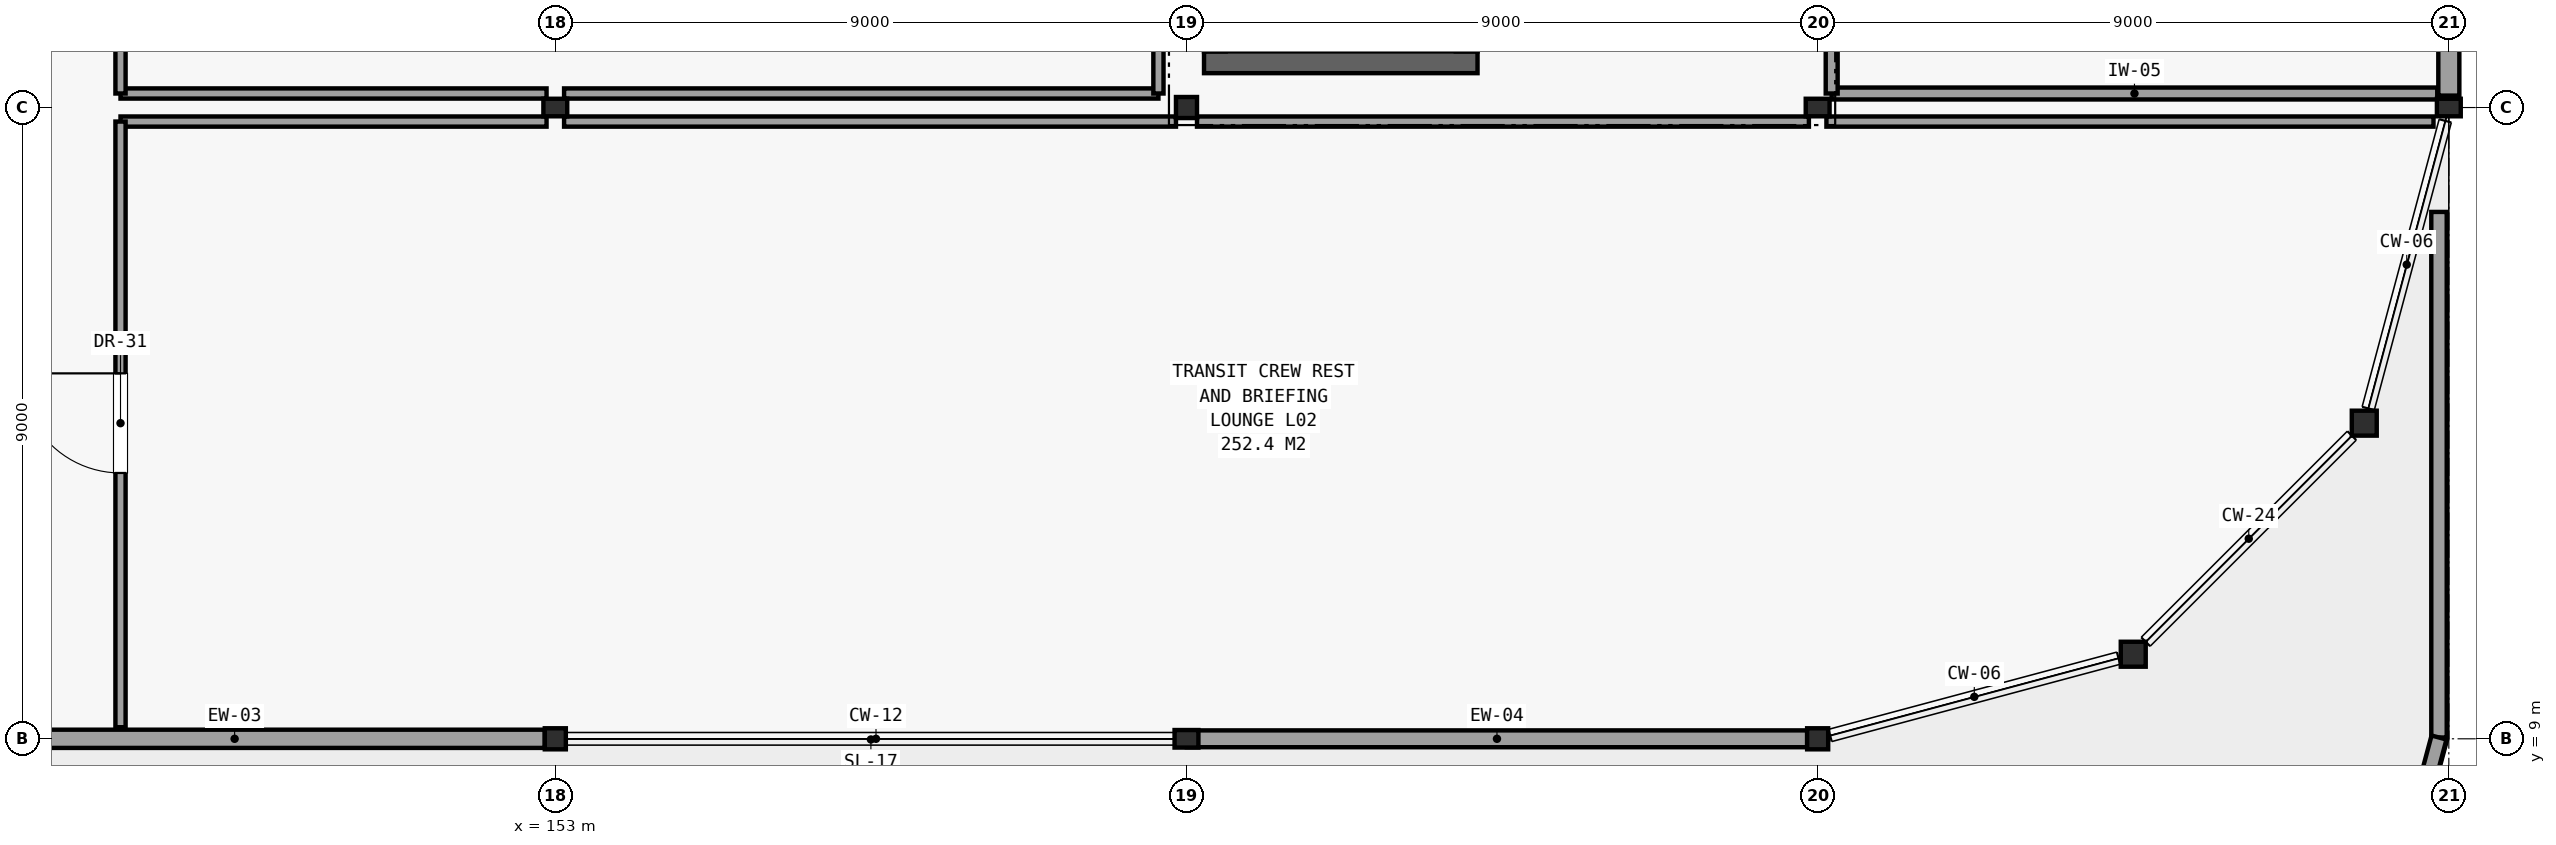
"""IFC4 building model, lengths in metres.
Left out: names, types, materials, properties, quantities, classifications, styles, units other than length and angle.
Written with IfcOpenShell. Run it as: python <this file> out.ifc"""

import sys

from ifc_helpers import new_model, si_unit, direction, frame, frame_2d, origin, origin_2d, place, context, subcontext, project, spatial, rectangle, hollow_rectangle, hollow_circle, i_section, extrude, element, fill, save


model = new_model("IFC4")
c1 = context("Model", 3, precision=1e-05, world=origin(), true_north=direction((0.0, 1.0)))
c2 = subcontext(c1, "Body", "Model", "MODEL_VIEW")
j1 = project(units=[si_unit("LENGTHUNIT", "METRE"), si_unit("PLANEANGLEUNIT", "RADIAN")], contexts=[c1])
p1 = place(None, origin())
s1 = spatial("IfcSite", under=j1, at=p1, CompositionType="ELEMENT")
p2 = place(p1, origin())
s2 = spatial("IfcBuilding", under=s1, at=p2, CompositionType="ELEMENT")
p3 = place(p2, frame((0.0, 0.0, 9.3)))
s3 = spatial("IfcBuildingStorey", under=s2, at=p3, CompositionType="ELEMENT", Elevation=9.3)
p4 = place(p3, frame((153.0, 9.0, 0.0), z_axis=(0.0, 0.0, 1.0), x_axis=(1.0, 0.0, 0.0)))
e1 = element("IfcColumn", 1, at=p4, inside=s3, PredefinedType="COLUMN", context=c2, shape_type="SweptSolid", body=[
    extrude(hollow_rectangle(XDim=0.3, YDim=0.3, WallThickness=0.012, at=origin_2d()), origin(), (0.0, 0.0, 1.0), 4.14),
])
p5 = place(p3, frame((153.0, 18.0, 0.0), z_axis=(0.0, 0.0, 1.0), x_axis=(1.0, 0.0, 0.0)))
e2 = element("IfcColumn", 2, at=p5, inside=s3, PredefinedType="COLUMN", context=c2, shape_type="SweptSolid", body=[
    extrude(i_section(OverallWidth=0.25, OverallDepth=0.34, WebThickness=0.009, FlangeThickness=0.014, FilletRadius=0.01, at=origin_2d()), origin(), (0.0, 0.0, 1.0), 4.2),
])
p6 = place(p3, frame((162.0, 9.0, 0.0), z_axis=(0.0, 0.0, 1.0), x_axis=(1.0, 0.0, 0.0)))
e3 = element("IfcColumn", 3, at=p6, inside=s3, PredefinedType="COLUMN", context=c2, shape_type="SweptSolid", body=[
    extrude(i_section(OverallWidth=0.25, OverallDepth=0.34, WebThickness=0.009, FlangeThickness=0.014, FilletRadius=0.01, at=origin_2d()), origin(), (0.0, 0.0, 1.0), 4.14),
])
p7 = place(p3, frame((162.0, 18.0, 0.0), z_axis=(0.0, 0.0, 1.0), x_axis=(1.0, 0.0, 0.0)))
e4 = element("IfcColumn", 4, at=p7, inside=s3, PredefinedType="COLUMN", context=c2, shape_type="SweptSolid", body=[
    extrude(hollow_rectangle(XDim=0.3, YDim=0.3, WallThickness=0.012, at=origin_2d()), origin(), (0.0, 0.0, 1.0), 4.2),
])
p8 = place(p3, frame((171.0, 9.0, 0.0), z_axis=(0.0, 0.0, 1.0), x_axis=(1.0, 0.0, 0.0)))
e5 = element("IfcColumn", 5, at=p8, inside=s3, PredefinedType="COLUMN", context=c2, shape_type="SweptSolid", body=[
    extrude(hollow_rectangle(XDim=0.3, YDim=0.3, WallThickness=0.012, at=origin_2d()), origin(), (0.0, 0.0, 1.0), 4.14),
])
p9 = place(p3, frame((171.0, 18.0, 0.0), z_axis=(0.0, 0.0, 1.0), x_axis=(1.0, 0.0, 0.0)))
e6 = element("IfcColumn", 6, at=p9, inside=s3, PredefinedType="COLUMN", context=c2, shape_type="SweptSolid", body=[
    extrude(i_section(OverallWidth=0.25, OverallDepth=0.34, WebThickness=0.009, FlangeThickness=0.014, FilletRadius=0.01, at=origin_2d()), origin(), (0.0, 0.0, 1.0), 4.2),
])
for number, where, z_axis, x_axis in (
    (7, (175.5, 10.206, 0.0), (0.0, 0.0, 1.0), (1.0, 0.0, 0.0)),
    (8, (178.794, 13.5, 0.0), (0.0, 0.0, 1.0), (1.0, 0.0, 0.0)),
):
    element("IfcColumn", number, at=place(p3, frame(where, z_axis=z_axis, x_axis=x_axis)), inside=s3, PredefinedType="COLUMN", context=c2, shape_type="SweptSolid", body=[
        extrude(hollow_circle(Radius=0.178, WallThickness=0.013, at=origin_2d()), origin(), (0.0, 0.0, 1.0), 4.14),
    ])
p10 = place(p3, frame((180.0, 18.0, 0.0), z_axis=(0.0, 0.0, 1.0), x_axis=(1.0, 0.0, 0.0)))
e9 = element("IfcColumn", 9, at=p10, inside=s3, PredefinedType="COLUMN", context=c2, shape_type="SweptSolid", body=[
    extrude(i_section(OverallWidth=0.25, OverallDepth=0.34, WebThickness=0.009, FlangeThickness=0.014, FilletRadius=0.01, at=origin_2d()), origin(), (0.0, 0.0, 1.0), 4.14),
])
p11 = place(p3, frame((144.004, 9.0, 0.0), z_axis=(0.0, 0.0, 1.0), x_axis=(1.0, 0.0, 0.0)))
e10 = element("IfcWall", 10, at=p11, inside=s3, PredefinedType="SOLIDWALL", context=c2, shape_type="SweptSolid", body=[
    extrude(rectangle(XDim=8.846, YDim=0.26, at=frame_2d((4.423, 0.0))), origin(), (0.0, 0.0, 1.0), 3.29),
])
p12 = place(p3, frame((162.004, 9.0, 0.0), z_axis=(0.0, 0.0, 1.0), x_axis=(1.0, 0.0, 0.0)))
e11 = element("IfcWall", 11, at=p12, inside=s3, PredefinedType="SOLIDWALL", context=c2, shape_type="SweptSolid", body=[
    extrude(rectangle(XDim=8.846, YDim=0.24, at=frame_2d((4.423, 0.0))), origin(), (0.0, 0.0, 1.0), 3.29),
])
p13 = place(p3, frame((180.0, 18.17, 0.0), z_axis=(0.0, 0.0, 1.0), x_axis=(0.0, 1.0, 0.0)))
e12 = element("IfcWall", 12, at=p13, inside=s3, PredefinedType="SOLIDWALL", context=c2, shape_type="SweptSolid", body=[
    extrude(rectangle(XDim=8.68, YDim=0.3, at=frame_2d((4.34, 0.0))), origin(), (0.0, 0.0, 1.0), 3.29),
])
p14 = place(p3, frame((179.86, 16.512, 0.0), z_axis=(0.0, 0.0, 1.0), x_axis=(0.0, -1.0, 0.0)))
e13 = element("IfcWall", 13, at=p14, inside=s3, PredefinedType="PARAPET", context=c2, shape_type="SweptSolid", body=[
    extrude(rectangle(XDim=7.493, YDim=0.22, at=frame_2d((3.747, 0.0))), origin(), (0.0, 0.0, 1.0), 0.52),
])
p15 = place(p3, frame((179.86, 9.018, 0.0), z_axis=(0.0, 0.0, 1.0), x_axis=(-0.258850976204, -0.965917269811, 0.0)))
e14 = element("IfcWall", 14, at=p15, inside=s3, PredefinedType="PARAPET", context=c2, shape_type="SweptSolid", body=[
    extrude(rectangle(XDim=4.603, YDim=0.22, at=frame_2d((2.301, 0.0))), origin(), (0.0, 0.0, 1.0), 0.52),
])
p16 = place(p3, frame((162.25, 18.645, 0.0), z_axis=(0.0, 0.0, 1.0), x_axis=(1.0, 0.0, 0.0)))
e15 = element("IfcWall", 15, at=p16, inside=s3, PredefinedType="SHEAR", context=c2, shape_type="SweptSolid", body=[
    extrude(rectangle(XDim=3.9, YDim=0.31, at=frame_2d((1.95, 0.0))), origin(), (0.0, 0.0, 1.0), 3.95),
])
p17 = place(p3, frame((146.8, 18.2, 0.0), z_axis=(0.0, 0.0, 1.0), x_axis=(1.0, 0.0, 0.0)))
e16 = element("IfcWall", 16, at=p17, inside=s3, PredefinedType="PARTITIONING", context=c2, shape_type="SweptSolid", body=[
    extrude(rectangle(XDim=6.075, YDim=0.145, at=frame_2d((3.038, 0.0))), origin(), (0.0, 0.0, 1.0), 3.29),
])
p18 = place(p3, frame((153.125, 18.2, 0.0), z_axis=(0.0, 0.0, 1.0), x_axis=(1.0, 0.0, 0.0)))
e17 = element("IfcWall", 17, at=p18, inside=s3, PredefinedType="PARTITIONING", context=c2, shape_type="SweptSolid", body=[
    extrude(rectangle(XDim=8.475, YDim=0.145, at=frame_2d((4.238, 0.0))), origin(), (0.0, 0.0, 1.0), 3.29),
])
p19 = place(p3, frame((146.8, 18.2, 0.0), z_axis=(0.0, 0.0, 1.0), x_axis=(0.0, 1.0, 0.0)))
e18 = element("IfcWall", 18, at=p19, inside=s3, PredefinedType="PARTITIONING", context=c2, shape_type="SweptSolid", body=[
    extrude(rectangle(XDim=14.4, YDim=0.145, at=frame_2d((7.2, 0.0))), origin(), (0.0, 0.0, 1.0), 3.34),
])
p20 = place(p19, frame((9.66, 0.0, 0.0)))
e19 = element("IfcOpeningElement", 19, at=p20, cuts=e18, PredefinedType="OPENING", context=c2, shape_type="SweptSolid", body=[
    extrude(rectangle(XDim=1.28, YDim=2.3, at=frame_2d((0.64, 1.15))), frame((0.0, 0.083, 0.0), z_axis=(0.0, -1.0, 0.0), x_axis=(1.0, 0.0, 0.0)), (0.0, 0.0, 1.0), 0.167),
])
p21 = place(p3, frame((161.6, 18.2, 0.0), z_axis=(0.0, 0.0, 1.0), x_axis=(0.0, 1.0, 0.0)))
e20 = element("IfcWall", 20, at=p21, inside=s3, PredefinedType="PARTITIONING", context=c2, shape_type="SweptSolid", body=[
    extrude(rectangle(XDim=14.4, YDim=0.145, at=frame_2d((7.2, 0.0))), origin(), (0.0, 0.0, 1.0), 3.34),
])
p22 = place(p3, frame((171.2, 18.2, 0.0), z_axis=(0.0, 0.0, 1.0), x_axis=(1.0, 0.0, 0.0)))
e21 = element("IfcWall", 21, at=p22, inside=s3, PredefinedType="PARTITIONING", context=c2, shape_type="SweptSolid", body=[
    extrude(rectangle(XDim=8.635, YDim=0.17, at=frame_2d((4.317, 0.0))), origin(), (0.0, 0.0, 1.0), 3.29),
])
p23 = place(p3, frame((171.2, 18.2, 0.0), z_axis=(0.0, 0.0, 1.0), x_axis=(0.0, 1.0, 0.0)))
e22 = element("IfcWall", 22, at=p23, inside=s3, PredefinedType="PARTITIONING", context=c2, shape_type="SweptSolid", body=[
    extrude(rectangle(XDim=8.65, YDim=0.17, at=frame_2d((4.325, 0.0))), origin(), (0.0, 0.0, 1.0), 3.29),
])
p24 = place(p3, frame((146.8, 17.8, 0.0), z_axis=(0.0, 0.0, 1.0), x_axis=(1.0, 0.0, 0.0)))
e23 = element("IfcWall", 23, at=p24, inside=s3, PredefinedType="PARTITIONING", context=c2, shape_type="SweptSolid", body=[
    extrude(rectangle(XDim=6.075, YDim=0.145, at=frame_2d((3.038, 0.0))), origin(), (0.0, 0.0, 1.0), 3.29),
])
for number, where, z_axis, x_axis in (
    (24, (153.125, 17.8, 0.0), (0.0, 0.0, 1.0), (1.0, 0.0, 0.0)),
    (25, (162.15, 17.8, 0.0), (0.0, 0.0, 1.0), (1.0, 0.0, 0.0)),
):
    element("IfcWall", number, at=place(p3, frame(where, z_axis=z_axis, x_axis=x_axis)), inside=s3, PredefinedType="PARTITIONING", context=c2, shape_type="SweptSolid", body=[
        extrude(rectangle(XDim=8.725, YDim=0.145, at=frame_2d((4.363, 0.0))), origin(), (0.0, 0.0, 1.0), 3.29),
    ])
p25 = place(p3, frame((171.125, 17.8, 0.0), z_axis=(0.0, 0.0, 1.0), x_axis=(1.0, 0.0, 0.0)))
e26 = element("IfcWall", 26, at=p25, inside=s3, PredefinedType="PARTITIONING", context=c2, shape_type="SweptSolid", body=[
    extrude(rectangle(XDim=8.656, YDim=0.145, at=frame_2d((4.328, 0.0))), origin(), (0.0, 0.0, 1.0), 3.29),
])
p26 = place(p3, frame((146.8, 9.165, 0.0), z_axis=(0.0, 0.0, 1.0), x_axis=(0.0, 1.0, 0.0)))
e27 = element("IfcWall", 27, at=p26, inside=s3, PredefinedType="PARTITIONING", context=c2, shape_type="SweptSolid", body=[
    extrude(rectangle(XDim=8.635, YDim=0.145, at=frame_2d((4.317, 0.0))), origin(), (0.0, 0.0, 1.0), 3.34),
])
p27 = place(p26, frame((3.625, 0.0, 0.0)))
e28 = element("IfcOpeningElement", 28, at=p27, cuts=e27, PredefinedType="OPENING", context=c2, shape_type="SweptSolid", body=[
    extrude(rectangle(XDim=1.42, YDim=2.3, at=frame_2d((0.71, 1.15))), frame((0.0, 0.083, 0.0), z_axis=(0.0, -1.0, 0.0), x_axis=(1.0, 0.0, 0.0)), (0.0, 0.0, 1.0), 0.167),
])
p28 = place(p27, origin())
e29 = element("IfcDoor", 29, at=p28, inside=s3, OperationType="SINGLE_SWING_RIGHT", PredefinedType="DOOR", context=c2, shape_type="SweptSolid", body=[
    extrude(rectangle(XDim=1.42, YDim=2.3, at=frame_2d((0.71, 1.15))), frame((0.0, 0.025, 0.0), z_axis=(0.0, -1.0, 0.0), x_axis=(1.0, 0.0, 0.0)), (0.0, 0.0, 1.0), 0.05),
])
fill(e28, e29)
save(model, sys.argv[1])
